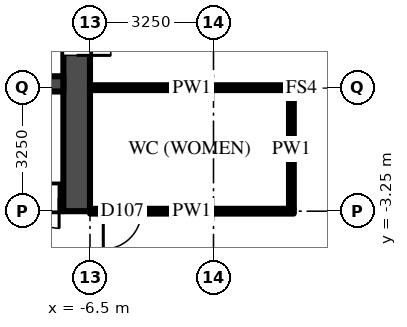
"""IFC4 building model, lengths in metres.
Left out: names, types, materials, properties, quantities, classifications, styles, units other than length and angle.
Written with IfcOpenShell. Run it as: python <this file> out.ifc"""

import sys

from ifc_helpers import new_model, si_unit, direction, frame, frame_2d, origin, place, context, subcontext, project, spatial, rectangle, extrude, source, transform, mapped, element, fill, save


model = new_model("IFC4")
c1 = context("Model", 3, precision=1e-05, world=origin(), true_north=direction((0.0, 1.0)))
c2 = subcontext(c1, "Body", "Model", "MODEL_VIEW")
j1 = project(units=[si_unit("LENGTHUNIT", "METRE"), si_unit("PLANEANGLEUNIT", "RADIAN")], contexts=[c1])
p1 = place(None, origin())
s1 = spatial("IfcSite", under=j1, at=p1, CompositionType="ELEMENT")
p2 = place(p1, origin())
s2 = spatial("IfcBuilding", under=s1, at=p2, CompositionType="ELEMENT")
p3 = place(p2, frame((0.0, 0.0, 47.5)))
s3 = spatial("IfcBuildingStorey", under=s2, at=p3, CompositionType="ELEMENT", Elevation=47.5)
m1 = source(origin(), c2, "Body", "SweptSolid", [
    extrude(rectangle(XDim=14.85, YDim=0.7, at=frame_2d((7.425, 0.0))), origin(), (0.0, 0.0, 1.0), 4.25),
])
p4 = place(p3, frame((-7.2, -2.9, 0.0), z_axis=(0.0, 0.0, 1.0), x_axis=(-1.0, 0.0, 0.0)))
e1 = element("IfcWall", 1, at=p4, inside=s3, PredefinedType="SHEAR", context=c2, shape_type="MappedRepresentation", body=[
    mapped(m1, transform((0.0, 0.0, 0.0))),
])
m2 = source(origin(), c2, "Body", "SweptSolid", [
    extrude(rectangle(XDim=1.3, YDim=2.1, at=frame_2d((0.65, 1.05))), frame((0.0, 0.36, 0.0), z_axis=(0.0, -1.0, 0.0), x_axis=(1.0, 0.0, 0.0)), (0.0, 0.0, 1.0), 0.72),
])
p5 = place(p4, frame((12.2, 0.0, 0.0)))
e2 = element("IfcOpeningElement", 2, at=p5, cuts=e1, PredefinedType="OPENING", context=c2, shape_type="MappedRepresentation", body=[
    mapped(m2, transform((0.0, 0.0, 0.0))),
])
m3 = source(origin(), c2, "Body", "SweptSolid", [
    extrude(rectangle(XDim=1.2, YDim=2.1, at=frame_2d((0.6, 1.05))), frame((0.0, 0.36, 0.0), z_axis=(0.0, -1.0, 0.0), x_axis=(1.0, 0.0, 0.0)), (0.0, 0.0, 1.0), 0.72),
])
p6 = place(p4, frame((9.85, 0.0, 0.0)))
e3 = element("IfcOpeningElement", 3, at=p6, cuts=e1, PredefinedType="OPENING", context=c2, shape_type="MappedRepresentation", body=[
    mapped(m3, transform((0.0, 0.0, 0.0))),
])
m4 = source(origin(), c2, "Body", "SweptSolid", [
    extrude(rectangle(XDim=1.0, YDim=2.1, at=frame_2d((0.5, 1.05))), frame((0.0, 0.36, 0.0), z_axis=(0.0, -1.0, 0.0), x_axis=(1.0, 0.0, 0.0)), (0.0, 0.0, 1.0), 0.72),
])
p7 = place(p4, frame((7.9, 0.0, 0.0)))
e4 = element("IfcOpeningElement", 4, at=p7, cuts=e1, PredefinedType="OPENING", context=c2, shape_type="MappedRepresentation", body=[
    mapped(m4, transform((0.0, 0.0, 0.0))),
])
m5 = source(origin(), c2, "Body", "SweptSolid", [
    extrude(rectangle(XDim=0.8, YDim=2.1, at=frame_2d((0.4, 1.05))), frame((0.0, 0.36, 0.0), z_axis=(0.0, -1.0, 0.0), x_axis=(1.0, 0.0, 0.0)), (0.0, 0.0, 1.0), 0.72),
])
p8 = place(p4, frame((0.113, 0.0, 0.0)))
e5 = element("IfcOpeningElement", 5, at=p8, cuts=e1, PredefinedType="OPENING", context=c2, shape_type="MappedRepresentation", body=[
    mapped(m5, transform((0.0, 0.0, 0.0))),
])
p9 = place(p4, frame((1.288, 0.0, 0.0)))
e6 = element("IfcOpeningElement", 6, at=p9, cuts=e1, PredefinedType="OPENING", context=c2, shape_type="MappedRepresentation", body=[
    mapped(m5, transform((0.0, 0.0, 0.0))),
])
p10 = place(p4, frame((2.712, 0.0, 0.0)))
e7 = element("IfcOpeningElement", 7, at=p10, cuts=e1, PredefinedType="OPENING", context=c2, shape_type="MappedRepresentation", body=[
    mapped(m5, transform((0.0, 0.0, 0.0))),
])
p11 = place(p4, frame((3.887, 0.0, 0.0)))
e8 = element("IfcOpeningElement", 8, at=p11, cuts=e1, PredefinedType="OPENING", context=c2, shape_type="MappedRepresentation", body=[
    mapped(m5, transform((0.0, 0.0, 0.0))),
])
p12 = place(p4, frame((5.312, 0.0, 0.0)))
e9 = element("IfcOpeningElement", 9, at=p12, cuts=e1, PredefinedType="OPENING", context=c2, shape_type="MappedRepresentation", body=[
    mapped(m5, transform((0.0, 0.0, 0.0))),
])
p13 = place(p4, frame((6.488, 0.0, 0.0)))
e10 = element("IfcOpeningElement", 10, at=p13, cuts=e1, PredefinedType="OPENING", context=c2, shape_type="MappedRepresentation", body=[
    mapped(m5, transform((0.0, 0.0, 0.0))),
])
m6 = source(origin(), c2, "Body", "SweptSolid", [
    extrude(rectangle(XDim=9.05, YDim=0.7, at=frame_2d((4.525, 0.0))), origin(), (0.0, 0.0, 1.0), 4.25),
])
p14 = place(p3, frame((-6.85, 5.8, 0.0), z_axis=(0.0, 0.0, 1.0), x_axis=(0.0, -1.0, 0.0)))
e11 = element("IfcWall", 11, at=p14, inside=s3, PredefinedType="SHEAR", context=c2, shape_type="MappedRepresentation", body=[
    mapped(m6, transform((0.0, 0.0, 0.0))),
])
m7 = source(origin(), c2, "Body", "SweptSolid", [
    extrude(rectangle(XDim=1.8, YDim=2.1, at=frame_2d((0.9, 1.05))), frame((0.0, 0.36, 0.0), z_axis=(0.0, -1.0, 0.0), x_axis=(1.0, 0.0, 0.0)), (0.0, 0.0, 1.0), 0.72),
])
p15 = place(p14, frame((3.15, 0.0, 0.0)))
e12 = element("IfcOpeningElement", 12, at=p15, cuts=e11, PredefinedType="OPENING", context=c2, shape_type="MappedRepresentation", body=[
    mapped(m7, transform((0.0, 0.0, 0.0))),
])
m8 = source(origin(), c2, "Body", "SweptSolid", [
    extrude(rectangle(XDim=14.85, YDim=0.4, at=frame_2d((7.425, 0.0))), origin(), (0.0, 0.0, 1.0), 4.25),
])
p16 = place(p3, frame((-7.2, 0.1, 0.0), z_axis=(0.0, 0.0, 1.0), x_axis=(-1.0, 0.0, 0.0)))
e13 = element("IfcWall", 13, at=p16, inside=s3, PredefinedType="SHEAR", context=c2, shape_type="MappedRepresentation", body=[
    mapped(m8, transform((0.0, 0.0, 0.0))),
])
m9 = source(origin(), c2, "Body", "SweptSolid", [
    extrude(rectangle(XDim=1.0, YDim=2.1, at=frame_2d((0.5, 1.05))), frame((0.0, 0.21, 0.0), z_axis=(0.0, -1.0, 0.0), x_axis=(1.0, 0.0, 0.0)), (0.0, 0.0, 1.0), 0.42),
])
p17 = place(p16, frame((7.9, 0.0, 0.0)))
e14 = element("IfcOpeningElement", 14, at=p17, cuts=e13, PredefinedType="OPENING", context=c2, shape_type="MappedRepresentation", body=[
    mapped(m9, transform((0.0, 0.0, 0.0))),
])
m10 = source(origin(), c2, "Body", "SweptSolid", [
    extrude(rectangle(XDim=3.125, YDim=0.125, at=frame_2d((1.562, 0.0))), origin(), (0.0, 0.0, 1.0), 3.546),
])
p18 = place(p3, frame((-1.2, -0.062, 0.0), z_axis=(0.0, 0.0, 1.0), x_axis=(0.0, -1.0, 0.0)))
e15 = element("IfcWall", 15, at=p18, inside=s3, PredefinedType="PARTITIONING", context=c2, shape_type="MappedRepresentation", body=[
    mapped(m10, transform((0.0, 0.0, 0.0))),
])
m11 = source(origin(), c2, "Body", "SweptSolid", [
    extrude(rectangle(XDim=5.363, YDim=0.125, at=frame_2d((2.681, 0.0))), origin(), (0.0, 0.0, 1.0), 3.468),
])
p19 = place(p3, frame((-1.137, -3.25, 0.0), z_axis=(0.0, 0.0, 1.0), x_axis=(-1.0, 0.0, 0.0)))
e16 = element("IfcWall", 16, at=p19, inside=s3, PredefinedType="PARTITIONING", context=c2, shape_type="MappedRepresentation", body=[
    mapped(m11, transform((0.0, 0.0, 0.0))),
])
m12 = source(origin(), c2, "Body", "SweptSolid", [
    extrude(rectangle(XDim=1.0, YDim=2.1, at=frame_2d((0.5, 1.05))), frame((0.0, 0.073, 0.0), z_axis=(0.0, -1.0, 0.0), x_axis=(1.0, 0.0, 0.0)), (0.0, 0.0, 1.0), 0.145),
])
p20 = place(p19, frame((4.012, 0.0, 0.0)))
e17 = element("IfcOpeningElement", 17, at=p20, cuts=e16, PredefinedType="OPENING", context=c2, shape_type="MappedRepresentation", body=[
    mapped(m12, transform((0.0, 0.0, 0.0))),
])
p21 = place(p3, frame((-1.137, 0.0, 0.0), z_axis=(0.0, 0.0, 1.0), x_axis=(-1.0, 0.0, 0.0)))
e18 = element("IfcWall", 18, at=p21, inside=s3, PredefinedType="PARTITIONING", context=c2, shape_type="MappedRepresentation", body=[
    mapped(m11, transform((0.0, 0.0, 0.0))),
])
m13 = source(origin(), c2, "Body", "SweptSolid", [
    extrude(rectangle(XDim=1.8, YDim=2.1, at=frame_2d((0.9, 1.05))), frame((0.0, -0.275, 0.0), z_axis=(0.0, -1.0, 0.0), x_axis=(1.0, 0.0, 0.0)), (0.0, 0.0, 1.0), 0.05),
])
p22 = place(p15, origin())
e19 = element("IfcDoor", 19, at=p22, inside=s3, OperationType="DOUBLE_DOOR_SINGLE_SWING", PredefinedType="DOOR", context=c2, shape_type="MappedRepresentation", body=[
    mapped(m13, transform((0.0, 0.0, 0.0))),
])
fill(e12, e19)
m14 = source(origin(), c2, "Body", "SweptSolid", [
    extrude(rectangle(XDim=0.8, YDim=2.1, at=frame_2d((0.4, 1.05))), frame((0.0, -0.275, 0.0), z_axis=(0.0, -1.0, 0.0), x_axis=(1.0, 0.0, 0.0)), (0.0, 0.0, 1.0), 0.05),
])
p23 = place(p8, origin())
e20 = element("IfcDoor", 20, at=p23, inside=s3, OperationType="SINGLE_SWING_LEFT", PredefinedType="DOOR", context=c2, shape_type="MappedRepresentation", body=[
    mapped(m14, transform((0.0, 0.0, 0.0))),
])
fill(e5, e20)
m15 = source(origin(), c2, "Body", "SweptSolid", [
    extrude(rectangle(XDim=1.0, YDim=2.1, at=frame_2d((0.5, 1.05))), frame((0.0, 0.025, 0.0), z_axis=(0.0, -1.0, 0.0), x_axis=(1.0, 0.0, 0.0)), (0.0, 0.0, 1.0), 0.05),
])
p24 = place(p20, origin())
e21 = element("IfcDoor", 21, at=p24, inside=s3, OperationType="SINGLE_SWING_RIGHT", PredefinedType="DOOR", context=c2, shape_type="MappedRepresentation", body=[
    mapped(m15, transform((0.0, 0.0, 0.0))),
])
fill(e17, e21)
save(model, sys.argv[1])
